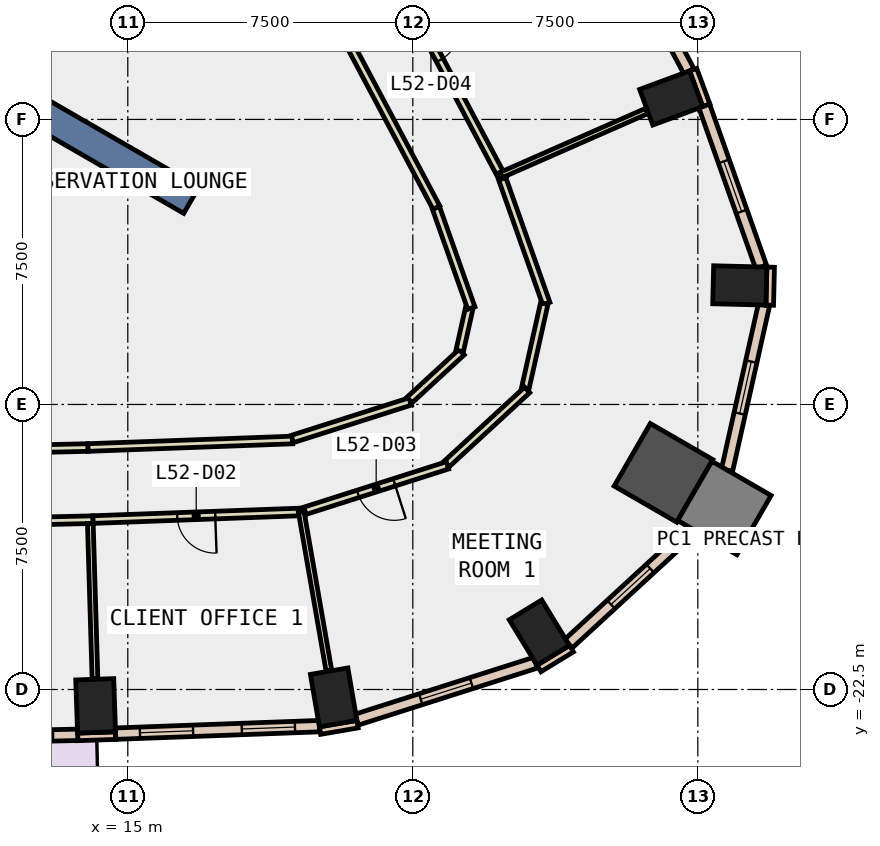
"""IFC4 building model, lengths in metres.
Left out: names, types, materials, properties, quantities, classifications, styles, units other than length and angle.
Written with IfcOpenShell. Run it as: python <this file> out.ifc"""

import sys

from ifc_helpers import new_model, si_unit, direction, frame, frame_2d, origin, origin_2d, place, context, subcontext, project, spatial, polyline, rectangle, outline, extrude, element, fill, save


model = new_model("IFC4")
c1 = context("Model", 3, precision=1e-05, world=origin(), true_north=direction((0.0, 1.0)))
c2 = subcontext(c1, "Body", "Model", "MODEL_VIEW")
j1 = project(units=[si_unit("LENGTHUNIT", "METRE"), si_unit("PLANEANGLEUNIT", "RADIAN")], contexts=[c1])
p1 = place(None, origin())
s1 = spatial("IfcSite", under=j1, at=p1, CompositionType="ELEMENT")
p2 = place(p1, origin())
s2 = spatial("IfcBuilding", under=s1, at=p2, CompositionType="ELEMENT")
p3 = place(p2, frame((0.0, 0.0, 231.8)))
s3 = spatial("IfcBuildingStorey", under=s2, at=p3, CompositionType="ELEMENT", Elevation=231.8)
for number, where, z_axis, x_axis in (
    (1, (14.154, -22.931, -0.4), (0.0, 0.0, 1.0), (0.999, 0.034, 0.0)),
    (2, (20.417, -22.708, -0.4), (0.0, 0.0, 1.0), (0.986, 0.169, 0.0)),
    (3, (25.83, -21.003, -0.4), (0.0, 0.0, 1.0), (0.853, 0.521, 0.0)),
):
    element("IfcColumn", number, at=place(p3, frame(where, z_axis=z_axis, x_axis=x_axis)), inside=s3, PredefinedType="COLUMN", context=c2, shape_type="SweptSolid", body=[
        extrude(rectangle(XDim=1.0, YDim=1.4, at=origin_2d()), origin(), (0.0, 0.0, 1.0), 4.0),
    ])
p4 = place(p3, frame((29.097, -16.799, -0.4), z_axis=(0.0, 0.0, 1.0), x_axis=(-0.866025403784, 0.5, 0.0)))
e4 = element("IfcColumn", 4, at=p4, inside=s3, PredefinedType="COLUMN", context=c2, shape_type="SweptSolid", body=[
    extrude(rectangle(XDim=1.9, YDim=1.9, at=origin_2d()), origin(), (0.0, 0.0, 1.0), 4.0),
])
for number, where, z_axis, x_axis in (
    (5, (31.104, -11.868, -0.4), (0.0, 0.0, 1.0), (0.025, 1.0, 0.0)),
    (6, (29.299, -6.936, -0.4), (0.0, 0.0, 1.0), (-0.347, 0.938, 0.0)),
):
    element("IfcColumn", number, at=place(p3, frame(where, z_axis=z_axis, x_axis=x_axis)), inside=s3, PredefinedType="COLUMN", context=c2, shape_type="SweptSolid", body=[
        extrude(rectangle(XDim=1.0, YDim=1.4, at=origin_2d()), origin(), (0.0, 0.0, 1.0), 4.0),
    ])
p5 = place(p3, frame((30.699, -17.724, -0.4), z_axis=(0.0, 0.0, 1.0), x_axis=(-0.866025403784, 0.5, 0.0)))
e7 = element("IfcColumn", 7, at=p5, inside=s3, PredefinedType="COLUMN", context=c2, shape_type="SweptSolid", body=[
    extrude(rectangle(XDim=1.8, YDim=1.8, at=origin_2d()), origin(), (0.0, 0.0, 1.0), 4.0),
])
p6 = place(p3, frame((0.0, 0.0, -0.4)))
e8 = element("IfcWall", 8, at=p6, inside=s3, PredefinedType="SHEAR", context=c2, shape_type="SweptSolid", body=[
    extrude(outline(polyline([(6.64, -9.0), (13.279, 2.5), (11.662, 2.5), (5.831, -7.6), (6.64, -9.0)])), origin(), (0.0, 0.0, 1.0), 4.0),
])
p7 = place(p3, frame((8.877, -5.125, -0.4), z_axis=(0.0, 0.0, 1.0), x_axis=(0.866017533419, -0.500013631625, 0.0)))
e9 = element("IfcWall", 9, at=p7, inside=s3, PredefinedType="SHEAR", context=c2, shape_type="SweptSolid", body=[
    extrude(rectangle(XDim=9.0, YDim=0.8, at=frame_2d((4.5, 0.0))), origin(), (0.0, 0.0, 1.0), 4.0),
])
p8 = place(p3, frame((30.223, -7.128, 0.0), z_axis=(0.0, 0.0, 1.0), x_axis=(-0.346892928577, 0.937904737222, 0.0)))
e10 = element("IfcWall", 10, at=p8, inside=s3, PredefinedType="STANDARD", context=c2, shape_type="SweptSolid", body=[
    extrude(rectangle(XDim=1.0, YDim=0.2, at=frame_2d((0.5, 0.0))), origin(), (0.0, 0.0, 1.0), 3.6),
])
p9 = place(p3, frame((13.682, -23.747, 0.0), z_axis=(0.0, 0.0, 1.0), x_axis=(0.999415245245, 0.034193092457, 0.0)))
e11 = element("IfcWall", 11, at=p9, inside=s3, PredefinedType="STANDARD", context=c2, shape_type="SweptSolid", body=[
    extrude(rectangle(XDim=1.0, YDim=0.2, at=frame_2d((0.5, 0.0))), origin(), (0.0, 0.0, 1.0), 3.6),
])
p10 = place(p3, frame((20.059, -23.581, 0.0), z_axis=(0.0, 0.0, 1.0), x_axis=(0.985631544579, 0.168909615862, 0.0)))
e12 = element("IfcWall", 12, at=p10, inside=s3, PredefinedType="STANDARD", context=c2, shape_type="SweptSolid", body=[
    extrude(rectangle(XDim=1.0, YDim=0.2, at=frame_2d((0.5, 0.0))), origin(), (0.0, 0.0, 1.0), 3.6),
])
p11 = place(p3, frame((25.82, -21.946, 0.0), z_axis=(0.0, 0.0, 1.0), x_axis=(0.853679739553, 0.520798331677, 0.0)))
e13 = element("IfcWall", 13, at=p11, inside=s3, PredefinedType="STANDARD", context=c2, shape_type="SweptSolid", body=[
    extrude(rectangle(XDim=1.0, YDim=0.2, at=frame_2d((0.5, 0.0))), origin(), (0.0, 0.0, 1.0), 3.6),
])
p12 = place(p3, frame((31.892, -12.387, 0.0), z_axis=(0.0, 0.0, 1.0), x_axis=(0.023942303888, 0.999713341956, 0.0)))
e14 = element("IfcWall", 14, at=p12, inside=s3, PredefinedType="STANDARD", context=c2, shape_type="SweptSolid", body=[
    extrude(rectangle(XDim=0.999, YDim=0.2, at=frame_2d((0.5, 0.0))), origin(), (0.0, 0.0, 1.0), 3.6),
])
p13 = place(p3, frame((8.297, -23.816, 0.0), z_axis=(0.0, 0.0, 1.0), x_axis=(0.999734766333, 0.023030349233, 0.0)))
e15 = element("IfcWall", 15, at=p13, inside=s3, PredefinedType="STANDARD", context=c2, shape_type="SweptSolid", body=[
    extrude(rectangle(XDim=5.385, YDim=0.3, at=frame_2d((2.693, 0.0))), origin(), (0.0, 0.0, 1.0), 3.6),
])
p14 = place(p13, frame((0.346, 0.0, 0.0)))
e16 = element("IfcOpeningElement", 16, at=p14, cuts=e15, PredefinedType="OPENING", context=c2, shape_type="SweptSolid", body=[
    extrude(rectangle(XDim=2.0, YDim=2.4, at=frame_2d((1.0, 1.2))), frame((0.0, 0.16, 0.0), z_axis=(0.0, -1.0, 0.0), x_axis=(1.0, 0.0, 0.0)), (0.0, 0.0, 1.0), 0.32),
])
p15 = place(p13, frame((3.339, 0.0, 0.9)))
e17 = element("IfcOpeningElement", 17, at=p15, cuts=e15, PredefinedType="OPENING", context=c2, shape_type="SweptSolid", body=[
    extrude(rectangle(XDim=1.4, YDim=2.6, at=frame_2d((0.7, 1.3))), frame((0.0, 0.16, 0.0), z_axis=(0.0, -1.0, 0.0), x_axis=(1.0, 0.0, 0.0)), (0.0, 0.0, 1.0), 0.32),
])
p16 = place(p3, frame((14.679, -23.662, 0.0), z_axis=(0.0, 0.0, 1.0), x_axis=(0.999318693414, 0.036907302717, 0.0)))
e18 = element("IfcWall", 18, at=p16, inside=s3, PredefinedType="STANDARD", context=c2, shape_type="SweptSolid", body=[
    extrude(rectangle(XDim=5.365, YDim=0.3, at=frame_2d((2.682, 0.0))), origin(), (0.0, 0.0, 1.0), 3.6),
])
p17 = place(p16, frame((0.641, 0.0, 0.9)))
e19 = element("IfcOpeningElement", 19, at=p17, cuts=e18, PredefinedType="OPENING", context=c2, shape_type="SweptSolid", body=[
    extrude(rectangle(XDim=1.4, YDim=2.6, at=frame_2d((0.7, 1.3))), frame((0.0, 0.16, 0.0), z_axis=(0.0, -1.0, 0.0), x_axis=(1.0, 0.0, 0.0)), (0.0, 0.0, 1.0), 0.32),
])
p18 = place(p16, frame((3.323, 0.0, 0.9)))
e20 = element("IfcOpeningElement", 20, at=p18, cuts=e18, PredefinedType="OPENING", context=c2, shape_type="SweptSolid", body=[
    extrude(rectangle(XDim=1.4, YDim=2.6, at=frame_2d((0.7, 1.3))), frame((0.0, 0.16, 0.0), z_axis=(0.0, -1.0, 0.0), x_axis=(1.0, 0.0, 0.0)), (0.0, 0.0, 1.0), 0.32),
])
p19 = place(p3, frame((21.023, -23.293, 0.0), z_axis=(0.0, 0.0, 1.0), x_axis=(0.952886818649, 0.30332608006, 0.0)))
e21 = element("IfcWall", 21, at=p19, inside=s3, PredefinedType="STANDARD", context=c2, shape_type="SweptSolid", body=[
    extrude(rectangle(XDim=4.939, YDim=0.3, at=frame_2d((2.469, 0.0))), origin(), (0.0, 0.0, 1.0), 3.6),
])
p20 = place(p19, frame((1.769, 0.0, 0.9)))
e22 = element("IfcOpeningElement", 22, at=p20, cuts=e21, PredefinedType="OPENING", context=c2, shape_type="SweptSolid", body=[
    extrude(rectangle(XDim=1.4, YDim=2.6, at=frame_2d((0.7, 1.3))), frame((0.0, 0.16, 0.0), z_axis=(0.0, -1.0, 0.0), x_axis=(1.0, 0.0, 0.0)), (0.0, 0.0, 1.0), 0.32),
])
p21 = place(p3, frame((26.594, -21.296, 0.0), z_axis=(0.0, 0.0, 1.0), x_axis=(0.735927731403, 0.67706009641, 0.0)))
e23 = element("IfcWall", 23, at=p21, inside=s3, PredefinedType="STANDARD", context=c2, shape_type="SweptSolid", body=[
    extrude(rectangle(XDim=4.45, YDim=0.3, at=frame_2d((2.225, 0.0))), origin(), (0.0, 0.0, 1.0), 3.6),
])
p22 = place(p21, frame((1.525, 0.0, 0.9)))
e24 = element("IfcOpeningElement", 24, at=p22, cuts=e23, PredefinedType="OPENING", context=c2, shape_type="SweptSolid", body=[
    extrude(rectangle(XDim=1.4, YDim=2.6, at=frame_2d((0.7, 1.3))), frame((0.0, 0.16, 0.0), z_axis=(0.0, -1.0, 0.0), x_axis=(1.0, 0.0, 0.0)), (0.0, 0.0, 1.0), 0.32),
])
p23 = place(p3, frame((30.769, -16.726, 0.0), z_axis=(0.0, 0.0, 1.0), x_axis=(0.218179157422, 0.975908733062, 0.0)))
e25 = element("IfcWall", 25, at=p23, inside=s3, PredefinedType="STANDARD", context=c2, shape_type="SweptSolid", body=[
    extrude(rectangle(XDim=4.45, YDim=0.3, at=frame_2d((2.225, 0.0))), origin(), (0.0, 0.0, 1.0), 3.6),
])
p24 = place(p23, frame((1.525, 0.0, 0.9)))
e26 = element("IfcOpeningElement", 26, at=p24, cuts=e25, PredefinedType="OPENING", context=c2, shape_type="SweptSolid", body=[
    extrude(rectangle(XDim=1.4, YDim=2.6, at=frame_2d((0.7, 1.3))), frame((0.0, 0.16, 0.0), z_axis=(0.0, -1.0, 0.0), x_axis=(1.0, 0.0, 0.0)), (0.0, 0.0, 1.0), 0.32),
])
p25 = place(p3, frame((31.666, -11.382, 0.0), z_axis=(0.0, 0.0, 1.0), x_axis=(-0.333280640478, 0.942827669663, 0.0)))
e27 = element("IfcWall", 27, at=p25, inside=s3, PredefinedType="STANDARD", context=c2, shape_type="SweptSolid", body=[
    extrude(rectangle(XDim=4.492, YDim=0.3, at=frame_2d((2.246, 0.0))), origin(), (0.0, 0.0, 1.0), 3.6),
])
p26 = place(p25, frame((1.546, 0.0, 0.9)))
e28 = element("IfcOpeningElement", 28, at=p26, cuts=e27, PredefinedType="OPENING", context=c2, shape_type="SweptSolid", body=[
    extrude(rectangle(XDim=1.4, YDim=2.6, at=frame_2d((0.7, 1.3))), frame((0.0, 0.16, 0.0), z_axis=(0.0, -1.0, 0.0), x_axis=(1.0, 0.0, 0.0)), (0.0, 0.0, 1.0), 0.32),
])
p27 = place(p3, frame((29.765, -6.232, 0.0), z_axis=(0.0, 0.0, 1.0), x_axis=(-0.469429229062, 0.882970100797, 0.0)))
e29 = element("IfcWall", 29, at=p27, inside=s3, PredefinedType="STANDARD", context=c2, shape_type="SweptSolid", body=[
    extrude(rectangle(XDim=7.404, YDim=0.3, at=frame_2d((3.702, 0.0))), origin(), (0.0, 0.0, 1.0), 3.6),
])
p28 = place(p27, frame((0.651, 0.0, 0.9)))
e30 = element("IfcOpeningElement", 30, at=p28, cuts=e29, PredefinedType="OPENING", context=c2, shape_type="SweptSolid", body=[
    extrude(rectangle(XDim=2.4, YDim=2.6, at=frame_2d((1.2, 1.3))), frame((0.0, 0.16, 0.0), z_axis=(0.0, -1.0, 0.0), x_axis=(1.0, 0.0, 0.0)), (0.0, 0.0, 1.0), 0.32),
])
p29 = place(p27, frame((4.353, 0.0, 0.9)))
e31 = element("IfcOpeningElement", 31, at=p29, cuts=e29, PredefinedType="OPENING", context=c2, shape_type="SweptSolid", body=[
    extrude(rectangle(XDim=2.4, YDim=2.6, at=frame_2d((1.2, 1.3))), frame((0.0, 0.16, 0.0), z_axis=(0.0, -1.0, 0.0), x_axis=(1.0, 0.0, 0.0)), (0.0, 0.0, 1.0), 0.32),
])
p30 = place(p3, frame((7.9, -16.274, 0.0), z_axis=(0.0, 0.0, 1.0), x_axis=(0.999729409829, 0.023261709391, 0.0)))
e32 = element("IfcWall", 32, at=p30, inside=s3, PredefinedType="PARTITIONING", context=c2, shape_type="SweptSolid", body=[
    extrude(rectangle(XDim=6.056, YDim=0.2, at=frame_2d((3.028, 0.0))), origin(), (0.0, 0.0, 1.0), 3.6),
])
p31 = place(p3, frame((13.954, -16.133, 0.0), z_axis=(0.0, 0.0, 1.0), x_axis=(0.999323686931, 0.036771847101, 0.0)))
e33 = element("IfcWall", 33, at=p31, inside=s3, PredefinedType="PARTITIONING", context=c2, shape_type="SweptSolid", body=[
    extrude(rectangle(XDim=5.385, YDim=0.2, at=frame_2d((2.692, 0.0))), origin(), (0.0, 0.0, 1.0), 3.6),
])
p32 = place(p3, frame((19.33, -15.909, 0.0), z_axis=(0.0, 0.0, 1.0), x_axis=(0.952831275662, 0.303500510906, 0.0)))
e34 = element("IfcWall", 34, at=p32, inside=s3, PredefinedType="PARTITIONING", context=c2, shape_type="SweptSolid", body=[
    extrude(rectangle(XDim=3.259, YDim=0.2, at=frame_2d((1.629, 0.0))), origin(), (0.0, 0.0, 1.0), 3.6),
])
p33 = place(p3, frame((22.414, -14.883, 0.0), z_axis=(0.0, 0.0, 1.0), x_axis=(0.735983257634, 0.676999737432, 0.0)))
e35 = element("IfcWall", 35, at=p33, inside=s3, PredefinedType="PARTITIONING", context=c2, shape_type="SweptSolid", body=[
    extrude(rectangle(XDim=1.863, YDim=0.2, at=frame_2d((0.931, 0.0))), origin(), (0.0, 0.0, 1.0), 3.6),
])
p34 = place(p3, frame((23.733, -13.592, 0.0), z_axis=(0.0, 0.0, 1.0), x_axis=(0.218746220366, 0.975781784558, 0.0)))
e36 = element("IfcWall", 36, at=p34, inside=s3, PredefinedType="PARTITIONING", context=c2, shape_type="SweptSolid", body=[
    extrude(rectangle(XDim=1.153, YDim=0.2, at=frame_2d((0.576, 0.0))), origin(), (0.0, 0.0, 1.0), 3.6),
])
p35 = place(p3, frame((24.04, -12.463, 0.0), z_axis=(0.0, 0.0, 1.0), x_axis=(-0.333166995935, 0.942867834227, 0.0)))
e37 = element("IfcWall", 37, at=p35, inside=s3, PredefinedType="PARTITIONING", context=c2, shape_type="SweptSolid", body=[
    extrude(rectangle(XDim=2.798, YDim=0.2, at=frame_2d((1.399, 0.0))), origin(), (0.0, 0.0, 1.0), 3.6),
])
p36 = place(p3, frame((23.121, -9.819, 0.0), z_axis=(0.0, 0.0, 1.0), x_axis=(-0.469450210487, 0.882958945746, 0.0)))
e38 = element("IfcWall", 38, at=p36, inside=s3, PredefinedType="PARTITIONING", context=c2, shape_type="SweptSolid", body=[
    extrude(rectangle(XDim=7.886, YDim=0.2, at=frame_2d((3.943, 0.0))), origin(), (0.0, 0.0, 1.0), 3.6),
])
p37 = place(p3, frame((14.086, -18.031, 0.0), z_axis=(0.0, 0.0, 1.0), x_axis=(-0.999731734638, -0.023161579355, 0.0)))
e39 = element("IfcWall", 39, at=p37, inside=s3, PredefinedType="PARTITIONING", context=c2, shape_type="SweptSolid", body=[
    extrude(rectangle(XDim=6.388, YDim=0.2, at=frame_2d((3.194, 0.0))), origin(), (0.0, 0.0, 1.0), 3.6),
])
p38 = place(p37, frame((2.694, 0.0, 0.0)))
e40 = element("IfcOpeningElement", 40, at=p38, cuts=e39, PredefinedType="OPENING", context=c2, shape_type="SweptSolid", body=[
    extrude(rectangle(XDim=1.0, YDim=2.1, at=frame_2d((0.5, 1.05))), frame((0.0, 0.11, 0.0), z_axis=(0.0, -1.0, 0.0), x_axis=(1.0, 0.0, 0.0)), (0.0, 0.0, 1.0), 0.22),
])
p39 = place(p3, frame((19.664, -17.824, 0.0), z_axis=(0.0, 0.0, 1.0), x_axis=(-0.999324862533, -0.036739884652, 0.0)))
e41 = element("IfcWall", 41, at=p39, inside=s3, PredefinedType="PARTITIONING", context=c2, shape_type="SweptSolid", body=[
    extrude(rectangle(XDim=5.582, YDim=0.2, at=frame_2d((2.791, 0.0))), origin(), (0.0, 0.0, 1.0), 3.6),
])
p40 = place(p39, frame((2.366, 0.0, 0.0)))
e42 = element("IfcOpeningElement", 42, at=p40, cuts=e41, PredefinedType="OPENING", context=c2, shape_type="SweptSolid", body=[
    extrude(rectangle(XDim=1.0, YDim=2.1, at=frame_2d((0.5, 1.05))), frame((0.0, 0.11, 0.0), z_axis=(0.0, -1.0, 0.0), x_axis=(1.0, 0.0, 0.0)), (0.0, 0.0, 1.0), 0.22),
])
p41 = place(p3, frame((24.852, -9.059, 0.0), z_axis=(0.0, 0.0, 1.0), x_axis=(0.333116923704, -0.942885526001, 0.0)))
e43 = element("IfcWall", 43, at=p41, inside=s3, PredefinedType="PARTITIONING", context=c2, shape_type="SweptSolid", body=[
    extrude(rectangle(XDim=3.485, YDim=0.2, at=frame_2d((1.742, 0.0))), origin(), (0.0, 0.0, 1.0), 3.6),
])
p42 = place(p3, frame((25.958, -12.348, 0.0), z_axis=(0.0, 0.0, 1.0), x_axis=(-0.2183498404, -0.975870558628, 0.0)))
e44 = element("IfcWall", 44, at=p42, inside=s3, PredefinedType="PARTITIONING", context=c2, shape_type="SweptSolid", body=[
    extrude(rectangle(XDim=2.294, YDim=0.2, at=frame_2d((1.147, 0.0))), origin(), (0.0, 0.0, 1.0), 3.6),
])
p43 = place(p3, frame((25.509, -14.617, 0.0), z_axis=(0.0, 0.0, 1.0), x_axis=(-0.735846476242, -0.677148405745, 0.0)))
e45 = element("IfcWall", 45, at=p43, inside=s3, PredefinedType="PARTITIONING", context=c2, shape_type="SweptSolid", body=[
    extrude(rectangle(XDim=2.878, YDim=0.2, at=frame_2d((1.439, 0.0))), origin(), (0.0, 0.0, 1.0), 3.6),
])
p44 = place(p3, frame((23.412, -16.603, 0.0), z_axis=(0.0, 0.0, 1.0), x_axis=(-0.952838618572, -0.303477457083, 0.0)))
e46 = element("IfcWall", 46, at=p44, inside=s3, PredefinedType="PARTITIONING", context=c2, shape_type="SweptSolid", body=[
    extrude(rectangle(XDim=3.938, YDim=0.2, at=frame_2d((1.969, 0.0))), origin(), (0.0, 0.0, 1.0), 3.6),
])
p45 = place(p44, frame((1.469, 0.0, 0.0)))
e47 = element("IfcOpeningElement", 47, at=p45, cuts=e46, PredefinedType="OPENING", context=c2, shape_type="SweptSolid", body=[
    extrude(rectangle(XDim=1.0, YDim=2.1, at=frame_2d((0.5, 1.05))), frame((0.0, 0.11, 0.0), z_axis=(0.0, -1.0, 0.0), x_axis=(1.0, 0.0, 0.0)), (0.0, 0.0, 1.0), 0.22),
])
p46 = place(p3, frame((21.089, -1.949, 0.0), z_axis=(0.0, 0.0, 1.0), x_axis=(0.469431794586, -0.882968736837, 0.0)))
e48 = element("IfcWall", 48, at=p46, inside=s3, PredefinedType="PARTITIONING", context=c2, shape_type="SweptSolid", body=[
    extrude(rectangle(XDim=8.046, YDim=0.2, at=frame_2d((4.023, 0.0))), origin(), (0.0, 0.0, 1.0), 3.6),
])
p47 = place(p46, frame((3.522, 0.0, 0.0)))
e49 = element("IfcOpeningElement", 49, at=p47, cuts=e48, PredefinedType="OPENING", context=c2, shape_type="SweptSolid", body=[
    extrude(rectangle(XDim=1.0, YDim=2.1, at=frame_2d((0.5, 1.05))), frame((0.0, 0.11, 0.0), z_axis=(0.0, -1.0, 0.0), x_axis=(1.0, 0.0, 0.0)), (0.0, 0.0, 1.0), 0.22),
])
p48 = place(p3, frame((14.014, -18.132, 0.0), z_axis=(0.0, 0.0, 1.0), x_axis=(0.029914181802, -0.999552470722, 0.0)))
e50 = element("IfcWall", 50, at=p48, inside=s3, PredefinedType="PARTITIONING", context=c2, shape_type="SweptSolid", body=[
    extrude(rectangle(XDim=4.081, YDim=0.15, at=frame_2d((2.04, 0.0))), origin(), (0.0, 0.0, 1.0), 3.6),
])
p49 = place(p3, frame((19.564, -17.828, 0.0), z_axis=(0.0, 0.0, 1.0), x_axis=(0.171715909123, -0.985146510197, 0.0)))
e51 = element("IfcWall", 51, at=p49, inside=s3, PredefinedType="PARTITIONING", context=c2, shape_type="SweptSolid", body=[
    extrude(rectangle(XDim=4.234, YDim=0.15, at=frame_2d((2.117, 0.0))), origin(), (0.0, 0.0, 1.0), 3.6),
])
p50 = place(p3, frame((24.819, -8.964, 0.0), z_axis=(0.0, 0.0, 1.0), x_axis=(0.915460951187, 0.402406817602, 0.0)))
e52 = element("IfcWall", 52, at=p50, inside=s3, PredefinedType="PARTITIONING", context=c2, shape_type="SweptSolid", body=[
    extrude(rectangle(XDim=4.192, YDim=0.15, at=frame_2d((2.096, 0.0))), origin(), (0.0, 0.0, 1.0), 3.6),
])
p51 = place(p15, origin())
e53 = element("IfcWindow", 53, at=p51, inside=s3, PartitioningType="SINGLE_PANEL", PredefinedType="WINDOW", context=c2, shape_type="SweptSolid", body=[
    extrude(rectangle(XDim=1.4, YDim=2.6, at=frame_2d((0.7, 1.3))), frame((0.0, 0.03, 0.0), z_axis=(0.0, -1.0, 0.0), x_axis=(1.0, 0.0, 0.0)), (0.0, 0.0, 1.0), 0.06),
])
fill(e17, e53)
p52 = place(p17, origin())
e54 = element("IfcWindow", 54, at=p52, inside=s3, PartitioningType="SINGLE_PANEL", PredefinedType="WINDOW", context=c2, shape_type="SweptSolid", body=[
    extrude(rectangle(XDim=1.4, YDim=2.6, at=frame_2d((0.7, 1.3))), frame((0.0, 0.03, 0.0), z_axis=(0.0, -1.0, 0.0), x_axis=(1.0, 0.0, 0.0)), (0.0, 0.0, 1.0), 0.06),
])
fill(e19, e54)
p53 = place(p18, origin())
e55 = element("IfcWindow", 55, at=p53, inside=s3, PartitioningType="SINGLE_PANEL", PredefinedType="WINDOW", context=c2, shape_type="SweptSolid", body=[
    extrude(rectangle(XDim=1.4, YDim=2.6, at=frame_2d((0.7, 1.3))), frame((0.0, 0.03, 0.0), z_axis=(0.0, -1.0, 0.0), x_axis=(1.0, 0.0, 0.0)), (0.0, 0.0, 1.0), 0.06),
])
fill(e20, e55)
p54 = place(p20, origin())
e56 = element("IfcWindow", 56, at=p54, inside=s3, PartitioningType="SINGLE_PANEL", PredefinedType="WINDOW", context=c2, shape_type="SweptSolid", body=[
    extrude(rectangle(XDim=1.4, YDim=2.6, at=frame_2d((0.7, 1.3))), frame((0.0, 0.03, 0.0), z_axis=(0.0, -1.0, 0.0), x_axis=(1.0, 0.0, 0.0)), (0.0, 0.0, 1.0), 0.06),
])
fill(e22, e56)
p55 = place(p22, origin())
e57 = element("IfcWindow", 57, at=p55, inside=s3, PartitioningType="SINGLE_PANEL", PredefinedType="WINDOW", context=c2, shape_type="SweptSolid", body=[
    extrude(rectangle(XDim=1.4, YDim=2.6, at=frame_2d((0.7, 1.3))), frame((0.0, 0.03, 0.0), z_axis=(0.0, -1.0, 0.0), x_axis=(1.0, 0.0, 0.0)), (0.0, 0.0, 1.0), 0.06),
])
fill(e24, e57)
p56 = place(p24, origin())
e58 = element("IfcWindow", 58, at=p56, inside=s3, PartitioningType="SINGLE_PANEL", PredefinedType="WINDOW", context=c2, shape_type="SweptSolid", body=[
    extrude(rectangle(XDim=1.4, YDim=2.6, at=frame_2d((0.7, 1.3))), frame((0.0, 0.03, 0.0), z_axis=(0.0, -1.0, 0.0), x_axis=(1.0, 0.0, 0.0)), (0.0, 0.0, 1.0), 0.06),
])
fill(e26, e58)
p57 = place(p26, origin())
e59 = element("IfcWindow", 59, at=p57, inside=s3, PartitioningType="SINGLE_PANEL", PredefinedType="WINDOW", context=c2, shape_type="SweptSolid", body=[
    extrude(rectangle(XDim=1.4, YDim=2.6, at=frame_2d((0.7, 1.3))), frame((0.0, 0.03, 0.0), z_axis=(0.0, -1.0, 0.0), x_axis=(1.0, 0.0, 0.0)), (0.0, 0.0, 1.0), 0.06),
])
fill(e28, e59)
p58 = place(p40, origin())
e60 = element("IfcDoor", 60, at=p58, inside=s3, OperationType="SINGLE_SWING_LEFT", PredefinedType="DOOR", context=c2, shape_type="SweptSolid", body=[
    extrude(rectangle(XDim=1.0, YDim=2.1, at=frame_2d((0.5, 1.05))), frame((0.0, 0.025, 0.0), z_axis=(0.0, -1.0, 0.0), x_axis=(1.0, 0.0, 0.0)), (0.0, 0.0, 1.0), 0.05),
])
fill(e42, e60)
p59 = place(p45, origin())
e61 = element("IfcDoor", 61, at=p59, inside=s3, OperationType="SINGLE_SWING_LEFT", PredefinedType="DOOR", context=c2, shape_type="SweptSolid", body=[
    extrude(rectangle(XDim=1.0, YDim=2.1, at=frame_2d((0.5, 1.05))), frame((0.0, 0.025, 0.0), z_axis=(0.0, -1.0, 0.0), x_axis=(1.0, 0.0, 0.0)), (0.0, 0.0, 1.0), 0.05),
])
fill(e47, e61)
p60 = place(p47, origin())
e62 = element("IfcDoor", 62, at=p60, inside=s3, OperationType="SINGLE_SWING_LEFT", PredefinedType="DOOR", context=c2, shape_type="SweptSolid", body=[
    extrude(rectangle(XDim=1.0, YDim=2.1, at=frame_2d((0.5, 1.05))), frame((0.0, 0.025, 0.0), z_axis=(0.0, -1.0, 0.0), x_axis=(1.0, 0.0, 0.0)), (0.0, 0.0, 1.0), 0.05),
])
fill(e49, e62)
save(model, sys.argv[1])
